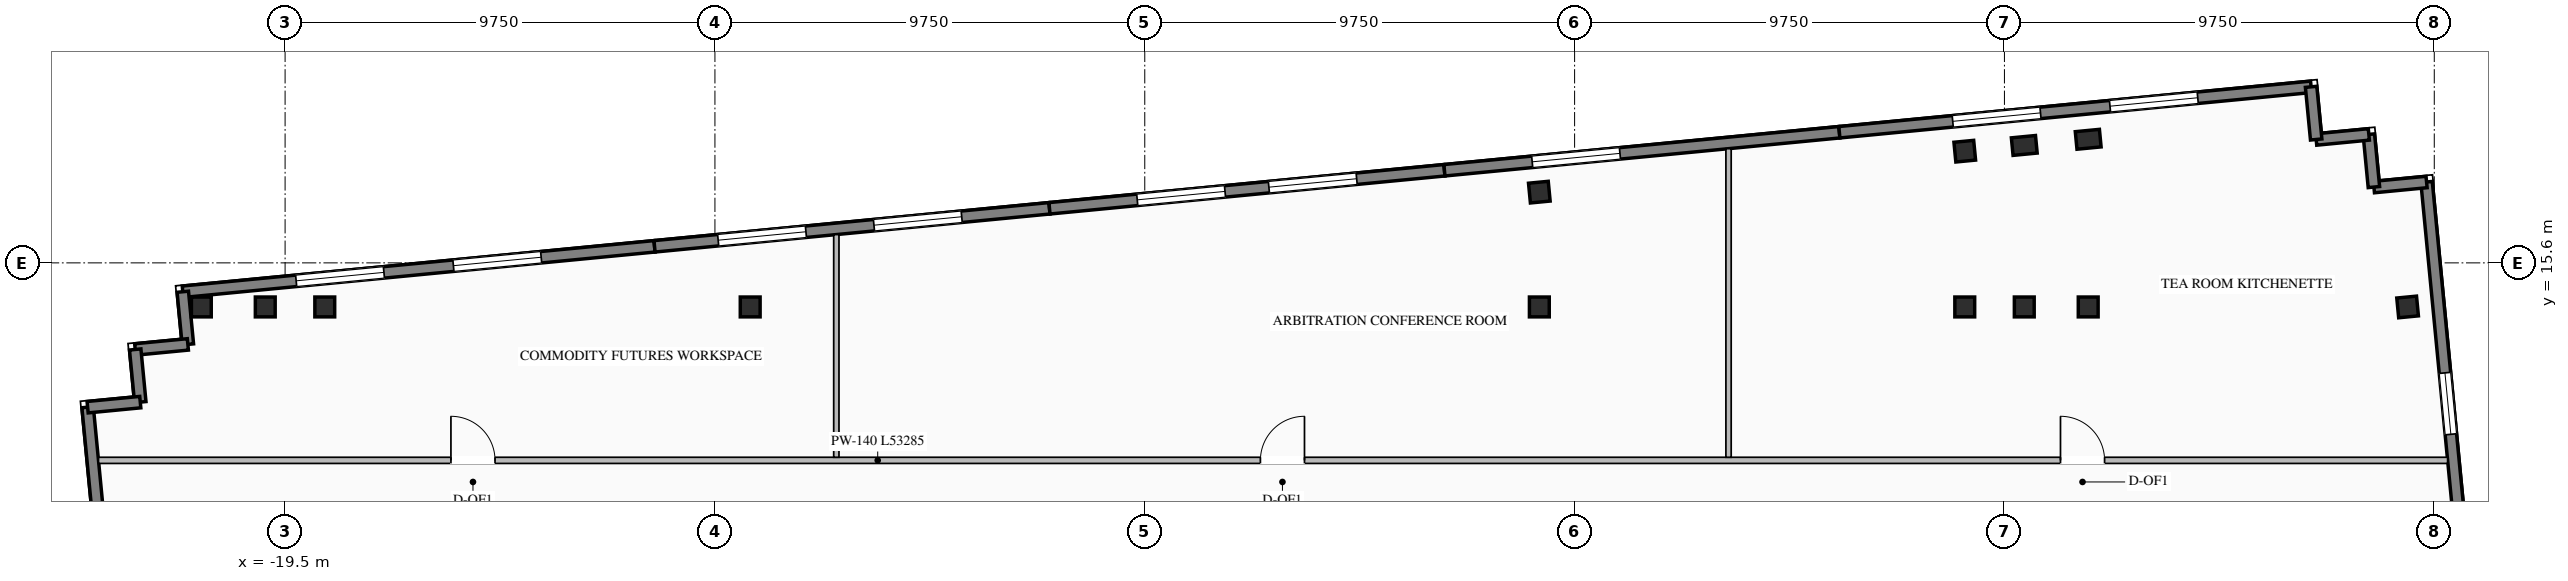
"""IFC4 building model, lengths in metres.
Left out: names, types, materials, properties, quantities, classifications, styles, units other than length and angle.
Written with IfcOpenShell. Run it as: python <this file> out.ifc"""

import sys

from ifc_helpers import new_model, si_unit, direction, frame, frame_2d, origin, origin_2d, place, context, subcontext, project, spatial, rectangle, i_section, extrude, element, fill, save


model = new_model("IFC4")
c1 = context("Model", 3, precision=1e-05, world=origin(), true_north=direction((0.0, 1.0)))
c2 = subcontext(c1, "Body", "Model", "MODEL_VIEW")
j1 = project(units=[si_unit("LENGTHUNIT", "METRE"), si_unit("PLANEANGLEUNIT", "RADIAN")], contexts=[c1])
p1 = place(None, origin())
s1 = spatial("IfcSite", under=j1, at=p1, CompositionType="ELEMENT")
p2 = place(p1, origin())
s2 = spatial("IfcBuilding", under=s1, at=p2, CompositionType="ELEMENT")
p3 = place(p2, frame((0.0, 0.0, 251.7)))
s3 = spatial("IfcBuildingStorey", under=s2, at=p3, CompositionType="ELEMENT", Elevation=251.7)
for number, where, z_axis, x_axis in (
    (1, (-21.4, 14.6, 0.0), (0.0, 0.0, 1.0), (1.0, 0.0, 0.0)),
    (2, (-19.95, 14.6, 0.0), (0.0, 0.0, 1.0), (1.0, 0.0, 0.0)),
    (3, (-18.6, 14.6, 0.0), (0.0, 0.0, 1.0), (1.0, 0.0, 0.0)),
    (4, (-8.95, 14.6, 0.0), (0.0, 0.0, 1.0), (1.0, 0.0, 0.0)),
    (5, (8.95, 14.6, 0.0), (0.0, 0.0, 1.0), (1.0, 0.0, 0.0)),
    (6, (18.6, 14.6, 0.0), (0.0, 0.0, 1.0), (1.0, 0.0, 0.0)),
    (7, (19.95, 14.6, 0.0), (0.0, 0.0, 1.0), (1.0, 0.0, 0.0)),
    (8, (21.4, 14.6, 0.0), (0.0, 0.0, 1.0), (1.0, 0.0, 0.0)),
    (9, (8.95, 17.205, 0.0), (0.0, 0.0, 1.0), (0.995, 0.096, 0.0)),
    (10, (18.6, 18.134, 0.0), (0.0, 0.0, 1.0), (0.995, 0.096, 0.0)),
    (11, (28.645, 14.6, 0.0), (0.0, 0.0, 1.0), (0.995, 0.096, 0.0)),
):
    element("IfcColumn", number, at=place(p3, frame(where, z_axis=z_axis, x_axis=x_axis)), inside=s3, PredefinedType="COLUMN", context=c2, shape_type="SweptSolid", body=[
        extrude(i_section(OverallWidth=0.45, OverallDepth=0.45, WebThickness=0.022, FlangeThickness=0.032, at=origin_2d()), origin(), (0.0, 0.0, 1.0), 3.45),
    ])
for number, where, z_axis, x_axis in (
    (12, (19.95, 18.264, 0.0), (0.0, 0.0, 1.0), (0.995, 0.096, 0.0)),
    (13, (21.4, 18.403, 0.0), (0.0, 0.0, 1.0), (0.995, 0.096, 0.0)),
):
    element("IfcColumn", number, at=place(p3, frame(where, z_axis=z_axis, x_axis=x_axis)), inside=s3, PredefinedType="PILASTER", context=c2, shape_type="SweptSolid", body=[
        extrude(rectangle(XDim=0.55, YDim=0.4, at=origin_2d()), origin(), (0.0, 0.0, 1.0), 3.45),
    ])
p4 = place(p3, frame((-21.821, 14.945, 0.0), z_axis=(0.0, 0.0, 1.0), x_axis=(0.995394787719, 0.095860401528, 0.0)))
e14 = element("IfcWall", 14, at=p4, inside=s3, PredefinedType="STANDARD", context=c2, shape_type="SweptSolid", body=[
    extrude(rectangle(XDim=10.75, YDim=0.26, at=frame_2d((5.375, 0.0))), origin(), (0.0, 0.0, 1.0), 3.25),
])
p5 = place(p4, frame((2.583, 0.0, 0.76)))
e15 = element("IfcOpeningElement", 15, at=p5, cuts=e14, PredefinedType="OPENING", context=c2, shape_type="SweptSolid", body=[
    extrude(rectangle(XDim=2.0, YDim=2.05, at=frame_2d((1.0, 1.025))), frame((0.0, 0.14, 0.0), z_axis=(0.0, -1.0, 0.0), x_axis=(1.0, 0.0, 0.0)), (0.0, 0.0, 1.0), 0.28),
])
p6 = place(p4, frame((6.167, 0.0, 0.76)))
e16 = element("IfcOpeningElement", 16, at=p6, cuts=e14, PredefinedType="OPENING", context=c2, shape_type="SweptSolid", body=[
    extrude(rectangle(XDim=2.0, YDim=2.05, at=frame_2d((1.0, 1.025))), frame((0.0, 0.14, 0.0), z_axis=(0.0, -1.0, 0.0), x_axis=(1.0, 0.0, 0.0)), (0.0, 0.0, 1.0), 0.28),
])
p7 = place(p3, frame((-11.12, 15.975, 0.0), z_axis=(0.0, 0.0, 1.0), x_axis=(0.995396794462, 0.09583956164, 0.0)))
e17 = element("IfcWall", 17, at=p7, inside=s3, PredefinedType="STANDARD", context=c2, shape_type="SweptSolid", body=[
    extrude(rectangle(XDim=9.0, YDim=0.26, at=frame_2d((4.5, 0.0))), origin(), (0.0, 0.0, 1.0), 3.25),
])
p8 = place(p7, frame((1.45, 0.0, 0.76)))
e18 = element("IfcOpeningElement", 18, at=p8, cuts=e17, PredefinedType="OPENING", context=c2, shape_type="SweptSolid", body=[
    extrude(rectangle(XDim=2.0, YDim=2.05, at=frame_2d((1.0, 1.025))), frame((0.0, 0.14, 0.0), z_axis=(0.0, -1.0, 0.0), x_axis=(1.0, 0.0, 0.0)), (0.0, 0.0, 1.0), 0.28),
])
p9 = place(p7, frame((5.0, 0.0, 0.76)))
e19 = element("IfcOpeningElement", 19, at=p9, cuts=e17, PredefinedType="OPENING", context=c2, shape_type="SweptSolid", body=[
    extrude(rectangle(XDim=2.0, YDim=2.05, at=frame_2d((1.0, 1.025))), frame((0.0, 0.14, 0.0), z_axis=(0.0, -1.0, 0.0), x_axis=(1.0, 0.0, 0.0)), (0.0, 0.0, 1.0), 0.28),
])
p10 = place(p3, frame((-2.161, 16.838, 0.0), z_axis=(0.0, 0.0, 1.0), x_axis=(0.995396794462, 0.09583956164, 0.0)))
e20 = element("IfcWall", 20, at=p10, inside=s3, PredefinedType="STANDARD", context=c2, shape_type="SweptSolid", body=[
    extrude(rectangle(XDim=9.0, YDim=0.26, at=frame_2d((4.5, 0.0))), origin(), (0.0, 0.0, 1.0), 3.25),
])
p11 = place(p10, frame((2.0, 0.0, 0.76)))
e21 = element("IfcOpeningElement", 21, at=p11, cuts=e20, PredefinedType="OPENING", context=c2, shape_type="SweptSolid", body=[
    extrude(rectangle(XDim=2.0, YDim=2.05, at=frame_2d((1.0, 1.025))), frame((0.0, 0.14, 0.0), z_axis=(0.0, -1.0, 0.0), x_axis=(1.0, 0.0, 0.0)), (0.0, 0.0, 1.0), 0.28),
])
p12 = place(p10, frame((5.0, 0.0, 0.76)))
e22 = element("IfcOpeningElement", 22, at=p12, cuts=e20, PredefinedType="OPENING", context=c2, shape_type="SweptSolid", body=[
    extrude(rectangle(XDim=2.0, YDim=2.05, at=frame_2d((1.0, 1.025))), frame((0.0, 0.14, 0.0), z_axis=(0.0, -1.0, 0.0), x_axis=(1.0, 0.0, 0.0)), (0.0, 0.0, 1.0), 0.28),
])
p13 = place(p3, frame((6.797, 17.7, 0.0), z_axis=(0.0, 0.0, 1.0), x_axis=(0.995394455533, 0.09586385082, 0.0)))
e23 = element("IfcWall", 23, at=p13, inside=s3, PredefinedType="STANDARD", context=c2, shape_type="SweptSolid", body=[
    extrude(rectangle(XDim=9.0, YDim=0.26, at=frame_2d((4.5, 0.0))), origin(), (0.0, 0.0, 1.0), 3.25),
])
p14 = place(p13, frame((2.0, 0.0, 0.76)))
e24 = element("IfcOpeningElement", 24, at=p14, cuts=e23, PredefinedType="OPENING", context=c2, shape_type="SweptSolid", body=[
    extrude(rectangle(XDim=2.0, YDim=2.05, at=frame_2d((1.0, 1.025))), frame((0.0, 0.14, 0.0), z_axis=(0.0, -1.0, 0.0), x_axis=(1.0, 0.0, 0.0)), (0.0, 0.0, 1.0), 0.28),
])
p15 = place(p3, frame((15.756, 18.563, 0.0), z_axis=(0.0, 0.0, 1.0), x_axis=(0.995396745868, 0.095840066339, 0.0)))
e25 = element("IfcWall", 25, at=p15, inside=s3, PredefinedType="STANDARD", context=c2, shape_type="SweptSolid", body=[
    extrude(rectangle(XDim=10.75, YDim=0.26, at=frame_2d((5.375, 0.0))), origin(), (0.0, 0.0, 1.0), 3.25),
])
p16 = place(p15, frame((2.583, 0.0, 0.76)))
e26 = element("IfcOpeningElement", 26, at=p16, cuts=e25, PredefinedType="OPENING", context=c2, shape_type="SweptSolid", body=[
    extrude(rectangle(XDim=2.0, YDim=2.05, at=frame_2d((1.0, 1.025))), frame((0.0, 0.14, 0.0), z_axis=(0.0, -1.0, 0.0), x_axis=(1.0, 0.0, 0.0)), (0.0, 0.0, 1.0), 0.28),
])
p17 = place(p15, frame((6.167, 0.0, 0.76)))
e27 = element("IfcOpeningElement", 27, at=p17, cuts=e25, PredefinedType="OPENING", context=c2, shape_type="SweptSolid", body=[
    extrude(rectangle(XDim=2.0, YDim=2.05, at=frame_2d((1.0, 1.025))), frame((0.0, 0.14, 0.0), z_axis=(0.0, -1.0, 0.0), x_axis=(1.0, 0.0, 0.0)), (0.0, 0.0, 1.0), 0.28),
])
p18 = place(p3, frame((-22.527, -2.754, 0.0), z_axis=(0.0, 0.0, 1.0), x_axis=(-0.095850890337, 0.995395703638, 0.0)))
e28 = element("IfcWall", 28, at=p18, inside=s3, PredefinedType="STANDARD", context=c2, shape_type="SweptSolid", body=[
    extrude(rectangle(XDim=15.15, YDim=0.26, at=frame_2d((7.575, 0.0))), origin(), (0.0, 0.0, 1.0), 3.25),
])
p19 = place(p18, frame((3.8, 0.0, 0.76)))
e29 = element("IfcOpeningElement", 29, at=p19, cuts=e28, PredefinedType="OPENING", context=c2, shape_type="SweptSolid", body=[
    extrude(rectangle(XDim=1.4, YDim=1.95, at=frame_2d((0.7, 0.975))), frame((0.0, 0.14, 0.0), z_axis=(0.0, -1.0, 0.0), x_axis=(1.0, 0.0, 0.0)), (0.0, 0.0, 1.0), 0.28),
])
p20 = place(p18, frame((9.4, 0.0, 0.76)))
e30 = element("IfcOpeningElement", 30, at=p20, cuts=e28, PredefinedType="OPENING", context=c2, shape_type="SweptSolid", body=[
    extrude(rectangle(XDim=1.4, YDim=1.95, at=frame_2d((0.7, 0.975))), frame((0.0, 0.14, 0.0), z_axis=(0.0, -1.0, 0.0), x_axis=(1.0, 0.0, 0.0)), (0.0, 0.0, 1.0), 0.28),
])
p21 = place(p3, frame((29.075, 17.435, 0.0), z_axis=(0.0, 0.0, 1.0), x_axis=(0.095850890337, -0.995395703638, 0.0)))
e31 = element("IfcWall", 31, at=p21, inside=s3, PredefinedType="STANDARD", context=c2, shape_type="SweptSolid", body=[
    extrude(rectangle(XDim=15.15, YDim=0.26, at=frame_2d((7.575, 0.0))), origin(), (0.0, 0.0, 1.0), 3.25),
])
p22 = place(p21, frame((4.35, 0.0, 0.76)))
e32 = element("IfcOpeningElement", 32, at=p22, cuts=e31, PredefinedType="OPENING", context=c2, shape_type="SweptSolid", body=[
    extrude(rectangle(XDim=1.4, YDim=1.95, at=frame_2d((0.7, 0.975))), frame((0.0, 0.14, 0.0), z_axis=(0.0, -1.0, 0.0), x_axis=(1.0, 0.0, 0.0)), (0.0, 0.0, 1.0), 0.28),
])
p23 = place(p21, frame((9.4, 0.0, 0.76)))
e33 = element("IfcOpeningElement", 33, at=p23, cuts=e31, PredefinedType="OPENING", context=c2, shape_type="SweptSolid", body=[
    extrude(rectangle(XDim=1.4, YDim=1.95, at=frame_2d((0.7, 0.975))), frame((0.0, 0.14, 0.0), z_axis=(0.0, -1.0, 0.0), x_axis=(1.0, 0.0, 0.0)), (0.0, 0.0, 1.0), 0.28),
])
for number, where, z_axis, x_axis in (
    (34, (29.075, 17.435, 0.0), (0.0, 0.0, 1.0), (-0.995, -0.096, 0.0)),
    (35, (27.881, 17.32, 0.0), (0.0, 0.0, 1.0), (-0.096, 0.995, 0.0)),
):
    element("IfcWall", number, at=place(p3, frame(where, z_axis=z_axis, x_axis=x_axis)), inside=s3, PredefinedType="STANDARD", context=c2, shape_type="SweptSolid", body=[
        extrude(rectangle(XDim=1.2, YDim=0.26, at=frame_2d((0.6, 0.0))), origin(), (0.0, 0.0, 1.0), 3.25),
    ])
for number, where, z_axis, x_axis in (
    (36, (27.766, 18.514, 0.0), (0.0, 0.0, 1.0), (-0.995, -0.096, 0.0)),
    (37, (26.571, 18.399, 0.0), (0.0, 0.0, 1.0), (-0.096, 0.995, 0.0)),
):
    element("IfcWall", number, at=place(p3, frame(where, z_axis=z_axis, x_axis=x_axis)), inside=s3, PredefinedType="STANDARD", context=c2, shape_type="SweptSolid", body=[
        extrude(rectangle(XDim=1.2, YDim=0.26, at=frame_2d((0.6, 0.0))), origin(), (0.0, 0.0, 1.0), 3.25),
    ])
p24 = place(p3, frame((-21.821, 14.945, 0.0), z_axis=(0.0, 0.0, 1.0), x_axis=(0.096038073607, -0.995377661201, 0.0)))
e38 = element("IfcWall", 38, at=p24, inside=s3, PredefinedType="STANDARD", context=c2, shape_type="SweptSolid", body=[
    extrude(rectangle(XDim=1.2, YDim=0.26, at=frame_2d((0.6, 0.0))), origin(), (0.0, 0.0, 1.0), 2.565),
])
for number, where, z_axis, x_axis in (
    (39, (-21.705, 13.75, 0.0), (0.0, 0.0, 1.0), (-0.995, -0.096, 0.0)),
    (40, (-22.9, 13.635, 0.0), (0.0, 0.0, 1.0), (0.096, -0.995, 0.0)),
    (41, (-22.785, 12.441, 0.0), (0.0, 0.0, 1.0), (-0.995, -0.096, 0.0)),
):
    element("IfcWall", number, at=place(p3, frame(where, z_axis=z_axis, x_axis=x_axis)), inside=s3, PredefinedType="STANDARD", context=c2, shape_type="SweptSolid", body=[
        extrude(rectangle(XDim=1.2, YDim=0.26, at=frame_2d((0.6, 0.0))), origin(), (0.0, 0.0, 1.0), 2.565),
    ])
p25 = place(p3, frame((-23.733, 11.12, 0.0), z_axis=(0.0, 0.0, 1.0), x_axis=(1.0, 0.0, 0.0)))
e42 = element("IfcWall", 42, at=p25, inside=s3, PredefinedType="STANDARD", context=c2, shape_type="SweptSolid", body=[
    extrude(rectangle(XDim=53.285, YDim=0.14, at=frame_2d((26.643, 0.0))), origin(), (0.0, 0.0, 1.0), 3.25),
])
p26 = place(p25, frame((7.994, 0.0, 0.0)))
e43 = element("IfcOpeningElement", 43, at=p26, cuts=e42, PredefinedType="OPENING", context=c2, shape_type="SweptSolid", body=[
    extrude(rectangle(XDim=1.0, YDim=2.08, at=frame_2d((0.5, 1.04))), frame((0.0, 0.08, 0.0), z_axis=(0.0, -1.0, 0.0), x_axis=(1.0, 0.0, 0.0)), (0.0, 0.0, 1.0), 0.16),
])
p27 = place(p25, frame((26.356, 0.0, 0.0)))
e44 = element("IfcOpeningElement", 44, at=p27, cuts=e42, PredefinedType="OPENING", context=c2, shape_type="SweptSolid", body=[
    extrude(rectangle(XDim=1.0, YDim=2.08, at=frame_2d((0.5, 1.04))), frame((0.0, 0.08, 0.0), z_axis=(0.0, -1.0, 0.0), x_axis=(1.0, 0.0, 0.0)), (0.0, 0.0, 1.0), 0.16),
])
p28 = place(p25, frame((44.504, 0.0, 0.0)))
e45 = element("IfcOpeningElement", 45, at=p28, cuts=e42, PredefinedType="OPENING", context=c2, shape_type="SweptSolid", body=[
    extrude(rectangle(XDim=1.0, YDim=2.08, at=frame_2d((0.5, 1.04))), frame((0.0, 0.08, 0.0), z_axis=(0.0, -1.0, 0.0), x_axis=(1.0, 0.0, 0.0)), (0.0, 0.0, 1.0), 0.16),
])
p29 = place(p3, frame((-6.996, 11.19, 0.0), z_axis=(0.0, 0.0, 1.0), x_axis=(0.0, 1.0, 0.0)))
e46 = element("IfcWall", 46, at=p29, inside=s3, PredefinedType="STANDARD", context=c2, shape_type="SweptSolid", body=[
    extrude(rectangle(XDim=5.052, YDim=0.12, at=frame_2d((2.526, 0.0))), origin(), (0.0, 0.0, 1.0), 3.25),
])
p30 = place(p3, frame((13.242, 11.19, 0.0), z_axis=(0.0, 0.0, 1.0), x_axis=(0.0, 1.0, 0.0)))
e47 = element("IfcWall", 47, at=p30, inside=s3, PredefinedType="STANDARD", context=c2, shape_type="SweptSolid", body=[
    extrude(rectangle(XDim=7.0, YDim=0.12, at=frame_2d((3.5, 0.0))), origin(), (0.0, 0.0, 1.0), 3.25),
])
p31 = place(p5, origin())
e48 = element("IfcWindow", 48, at=p31, inside=s3, PartitioningType="DOUBLE_PANEL_VERTICAL", PredefinedType="WINDOW", context=c2, shape_type="SweptSolid", body=[
    extrude(rectangle(XDim=2.0, YDim=2.05, at=frame_2d((1.0, 1.025))), frame((0.0, 0.03, 0.0), z_axis=(0.0, -1.0, 0.0), x_axis=(1.0, 0.0, 0.0)), (0.0, 0.0, 1.0), 0.06),
])
fill(e15, e48)
p32 = place(p6, origin())
e49 = element("IfcWindow", 49, at=p32, inside=s3, PartitioningType="DOUBLE_PANEL_VERTICAL", PredefinedType="WINDOW", context=c2, shape_type="SweptSolid", body=[
    extrude(rectangle(XDim=2.0, YDim=2.05, at=frame_2d((1.0, 1.025))), frame((0.0, 0.03, 0.0), z_axis=(0.0, -1.0, 0.0), x_axis=(1.0, 0.0, 0.0)), (0.0, 0.0, 1.0), 0.06),
])
fill(e16, e49)
p33 = place(p8, origin())
e50 = element("IfcWindow", 50, at=p33, inside=s3, PartitioningType="DOUBLE_PANEL_VERTICAL", PredefinedType="WINDOW", context=c2, shape_type="SweptSolid", body=[
    extrude(rectangle(XDim=2.0, YDim=2.05, at=frame_2d((1.0, 1.025))), frame((0.0, 0.03, 0.0), z_axis=(0.0, -1.0, 0.0), x_axis=(1.0, 0.0, 0.0)), (0.0, 0.0, 1.0), 0.06),
])
fill(e18, e50)
p34 = place(p9, origin())
e51 = element("IfcWindow", 51, at=p34, inside=s3, PartitioningType="DOUBLE_PANEL_VERTICAL", PredefinedType="WINDOW", context=c2, shape_type="SweptSolid", body=[
    extrude(rectangle(XDim=2.0, YDim=2.05, at=frame_2d((1.0, 1.025))), frame((0.0, 0.03, 0.0), z_axis=(0.0, -1.0, 0.0), x_axis=(1.0, 0.0, 0.0)), (0.0, 0.0, 1.0), 0.06),
])
fill(e19, e51)
p35 = place(p11, origin())
e52 = element("IfcWindow", 52, at=p35, inside=s3, PartitioningType="DOUBLE_PANEL_VERTICAL", PredefinedType="WINDOW", context=c2, shape_type="SweptSolid", body=[
    extrude(rectangle(XDim=2.0, YDim=2.05, at=frame_2d((1.0, 1.025))), frame((0.0, 0.03, 0.0), z_axis=(0.0, -1.0, 0.0), x_axis=(1.0, 0.0, 0.0)), (0.0, 0.0, 1.0), 0.06),
])
fill(e21, e52)
p36 = place(p12, origin())
e53 = element("IfcWindow", 53, at=p36, inside=s3, PartitioningType="DOUBLE_PANEL_VERTICAL", PredefinedType="WINDOW", context=c2, shape_type="SweptSolid", body=[
    extrude(rectangle(XDim=2.0, YDim=2.05, at=frame_2d((1.0, 1.025))), frame((0.0, 0.03, 0.0), z_axis=(0.0, -1.0, 0.0), x_axis=(1.0, 0.0, 0.0)), (0.0, 0.0, 1.0), 0.06),
])
fill(e22, e53)
p37 = place(p14, origin())
e54 = element("IfcWindow", 54, at=p37, inside=s3, PartitioningType="DOUBLE_PANEL_VERTICAL", PredefinedType="WINDOW", context=c2, shape_type="SweptSolid", body=[
    extrude(rectangle(XDim=2.0, YDim=2.05, at=frame_2d((1.0, 1.025))), frame((0.0, 0.03, 0.0), z_axis=(0.0, -1.0, 0.0), x_axis=(1.0, 0.0, 0.0)), (0.0, 0.0, 1.0), 0.06),
])
fill(e24, e54)
p38 = place(p16, origin())
e55 = element("IfcWindow", 55, at=p38, inside=s3, PartitioningType="DOUBLE_PANEL_VERTICAL", PredefinedType="WINDOW", context=c2, shape_type="SweptSolid", body=[
    extrude(rectangle(XDim=2.0, YDim=2.05, at=frame_2d((1.0, 1.025))), frame((0.0, 0.03, 0.0), z_axis=(0.0, -1.0, 0.0), x_axis=(1.0, 0.0, 0.0)), (0.0, 0.0, 1.0), 0.06),
])
fill(e26, e55)
p39 = place(p17, origin())
e56 = element("IfcWindow", 56, at=p39, inside=s3, PartitioningType="DOUBLE_PANEL_VERTICAL", PredefinedType="WINDOW", context=c2, shape_type="SweptSolid", body=[
    extrude(rectangle(XDim=2.0, YDim=2.05, at=frame_2d((1.0, 1.025))), frame((0.0, 0.03, 0.0), z_axis=(0.0, -1.0, 0.0), x_axis=(1.0, 0.0, 0.0)), (0.0, 0.0, 1.0), 0.06),
])
fill(e27, e56)
p40 = place(p22, origin())
e57 = element("IfcWindow", 57, at=p40, inside=s3, PartitioningType="SINGLE_PANEL", PredefinedType="WINDOW", context=c2, shape_type="SweptSolid", body=[
    extrude(rectangle(XDim=1.4, YDim=1.95, at=frame_2d((0.7, 0.975))), frame((0.0, 0.03, 0.0), z_axis=(0.0, -1.0, 0.0), x_axis=(1.0, 0.0, 0.0)), (0.0, 0.0, 1.0), 0.06),
])
fill(e32, e57)
p41 = place(p26, origin())
e58 = element("IfcDoor", 58, at=p41, inside=s3, OperationType="SINGLE_SWING_LEFT", PredefinedType="DOOR", context=c2, shape_type="SweptSolid", body=[
    extrude(rectangle(XDim=1.0, YDim=2.08, at=frame_2d((0.5, 1.04))), frame((0.0, 0.025, 0.0), z_axis=(0.0, -1.0, 0.0), x_axis=(1.0, 0.0, 0.0)), (0.0, 0.0, 1.0), 0.05),
])
fill(e43, e58)
p42 = place(p27, origin())
e59 = element("IfcDoor", 59, at=p42, inside=s3, OperationType="SINGLE_SWING_RIGHT", PredefinedType="DOOR", context=c2, shape_type="SweptSolid", body=[
    extrude(rectangle(XDim=1.0, YDim=2.08, at=frame_2d((0.5, 1.04))), frame((0.0, 0.025, 0.0), z_axis=(0.0, -1.0, 0.0), x_axis=(1.0, 0.0, 0.0)), (0.0, 0.0, 1.0), 0.05),
])
fill(e44, e59)
p43 = place(p28, origin())
e60 = element("IfcDoor", 60, at=p43, inside=s3, OperationType="SINGLE_SWING_LEFT", PredefinedType="DOOR", context=c2, shape_type="SweptSolid", body=[
    extrude(rectangle(XDim=1.0, YDim=2.08, at=frame_2d((0.5, 1.04))), frame((0.0, 0.025, 0.0), z_axis=(0.0, -1.0, 0.0), x_axis=(1.0, 0.0, 0.0)), (0.0, 0.0, 1.0), 0.05),
])
fill(e45, e60)
save(model, sys.argv[1])
